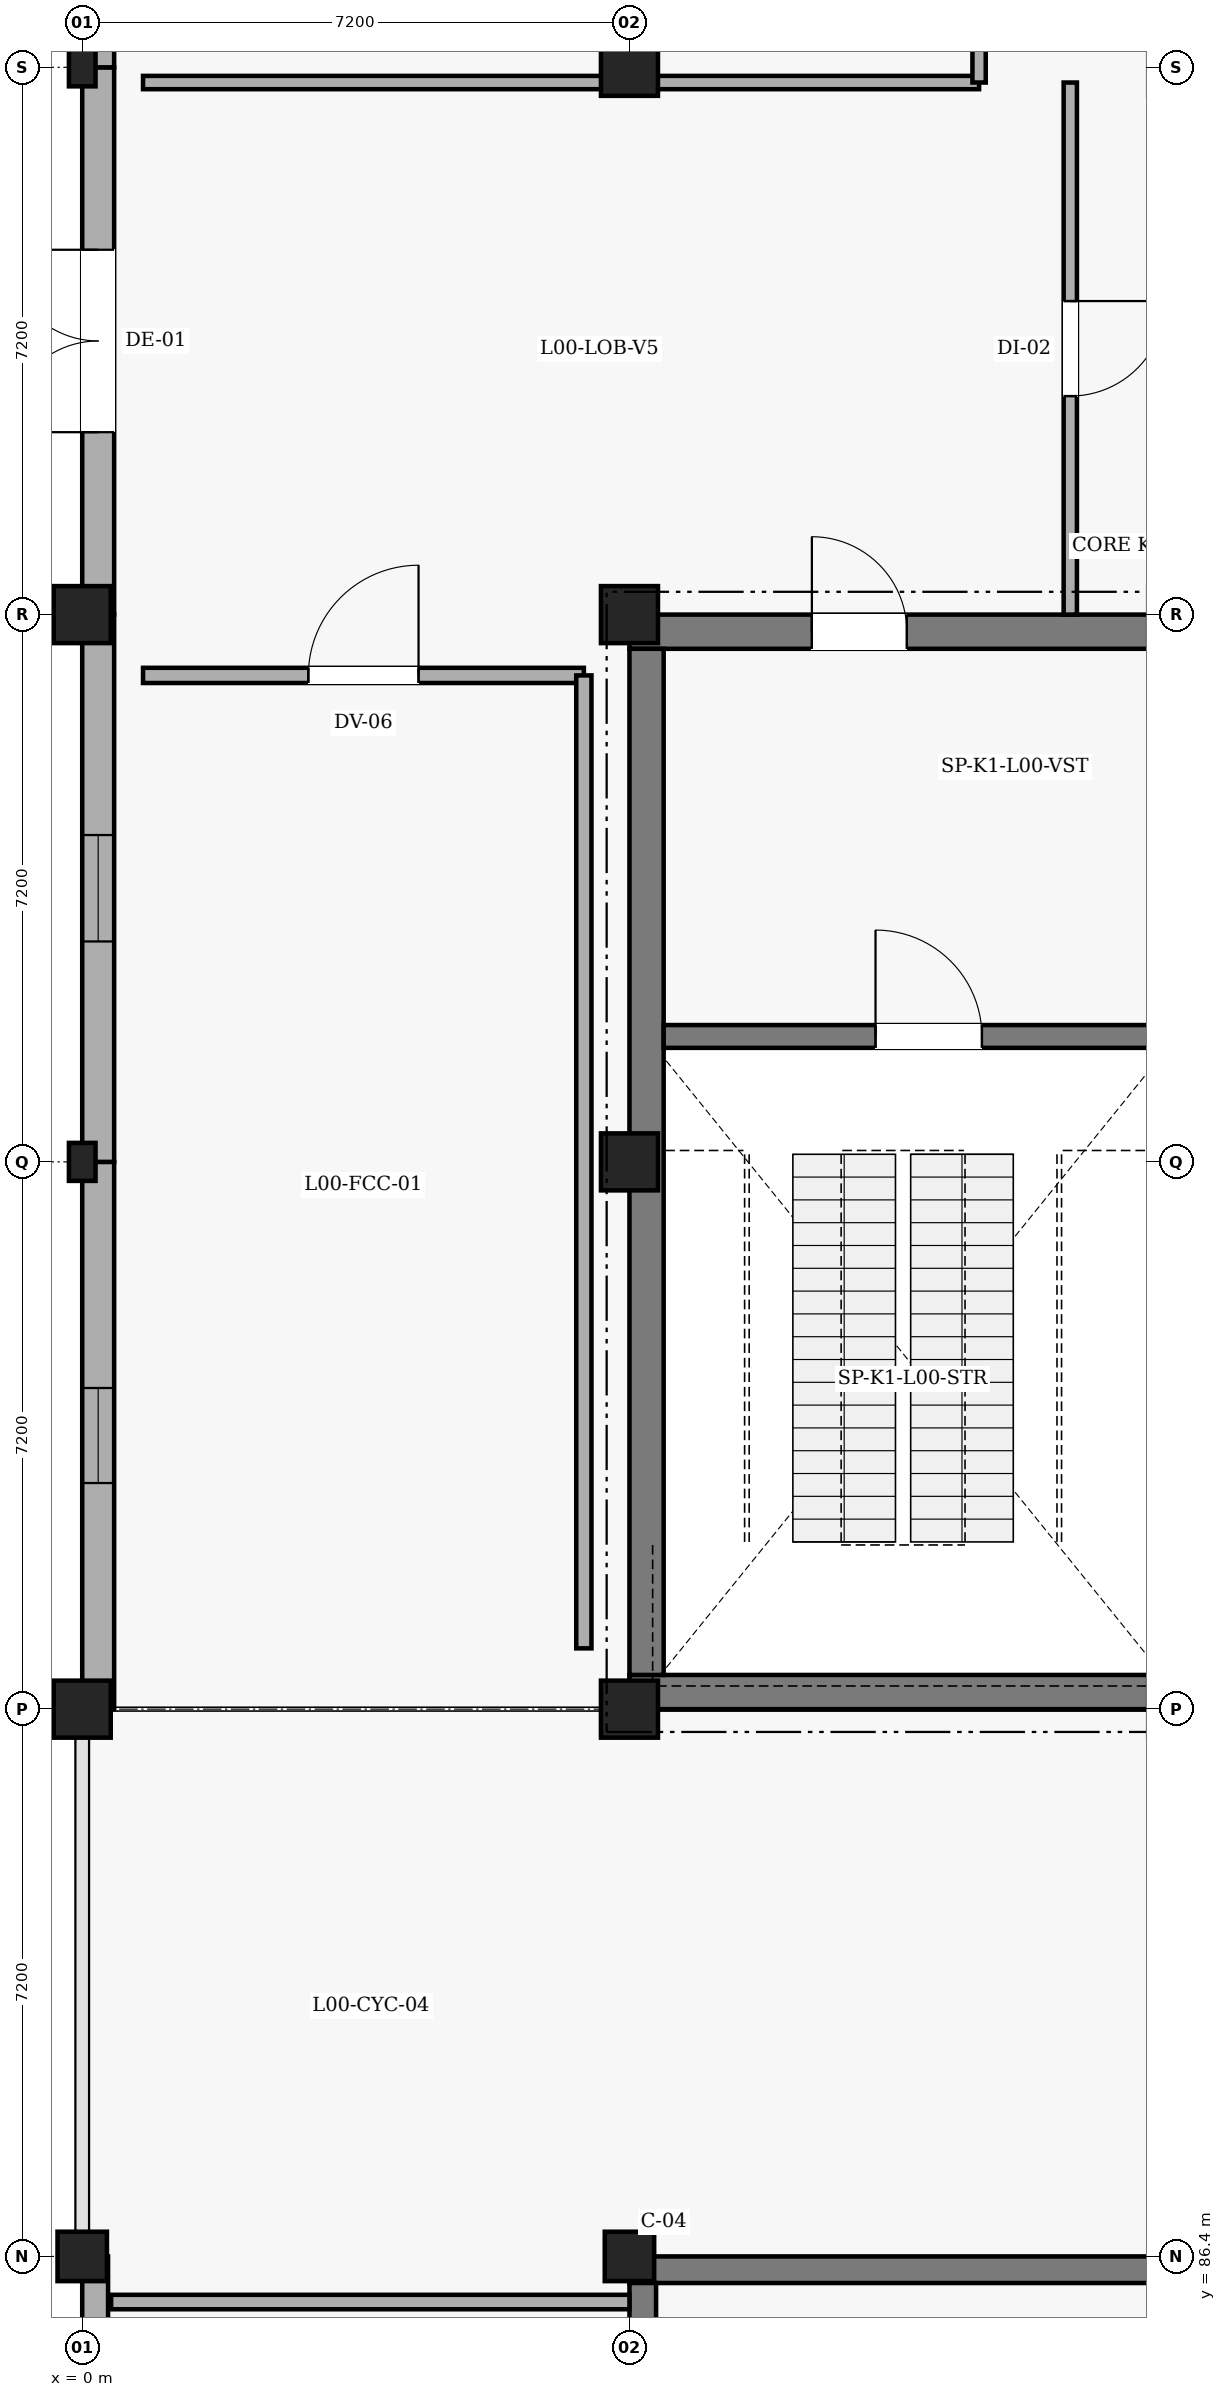
"""IFC4 building model, lengths in metres.
Left out: names, types, materials, properties, quantities, classifications, styles, units other than length and angle.
Written with IfcOpenShell. Run it as: python <this file> out.ifc"""

import sys

from ifc_helpers import new_model, si_unit, direction, frame, frame_2d, origin, origin_2d, place, context, subcontext, project, spatial, rectangle, extrude, element, fill, save


model = new_model("IFC4")
c1 = context("Model", 3, precision=1e-05, world=origin(), true_north=direction((0.0, 1.0)))
c2 = subcontext(c1, "Body", "Model", "MODEL_VIEW")
j1 = project(units=[si_unit("LENGTHUNIT", "METRE"), si_unit("PLANEANGLEUNIT", "RADIAN")], contexts=[c1])
p1 = place(None, origin())
s1 = spatial("IfcSite", under=j1, at=p1, CompositionType="ELEMENT")
p2 = place(p1, origin())
s2 = spatial("IfcBuilding", under=s1, at=p2, CompositionType="ELEMENT")
p3 = place(p2, origin())
s3 = spatial("IfcBuildingStorey", under=s2, at=p3, CompositionType="ELEMENT", Elevation=0.0)
p4 = place(p3, frame((7.2, 107.775, 0.0), z_axis=(0.0, 0.0, 1.0), x_axis=(1.0, 0.0, 0.0)))
e1 = element("IfcWall", 1, at=p4, inside=s3, PredefinedType="SHEAR", context=c2, shape_type="SweptSolid", body=[
    extrude(rectangle(XDim=14.4, YDim=0.45, at=frame_2d((7.2, 0.0))), origin(), (0.0, 0.0, 1.0), 5.4),
])
p5 = place(p4, frame((2.4, 0.0, 0.0)))
e2 = element("IfcOpeningElement", 2, at=p5, cuts=e1, PredefinedType="OPENING", context=c2, shape_type="SweptSolid", body=[
    extrude(rectangle(XDim=1.25, YDim=2.2, at=frame_2d((0.625, 1.1))), frame((0.0, 0.235, 0.0), z_axis=(0.0, -1.0, 0.0), x_axis=(1.0, 0.0, 0.0)), (0.0, 0.0, 1.0), 0.47),
])
p6 = place(p3, frame((21.6, 93.825, 0.0), z_axis=(0.0, 0.0, 1.0), x_axis=(-1.0, 0.0, 0.0)))
e3 = element("IfcWall", 3, at=p6, inside=s3, PredefinedType="SHEAR", context=c2, shape_type="SweptSolid", body=[
    extrude(rectangle(XDim=14.4, YDim=0.45, at=frame_2d((7.2, 0.0))), origin(), (0.0, 0.0, 1.0), 5.4),
])
p7 = place(p3, frame((7.425, 94.05, 0.0), z_axis=(0.0, 0.0, 1.0), x_axis=(0.0, 1.0, 0.0)))
e4 = element("IfcWall", 4, at=p7, inside=s3, PredefinedType="SHEAR", context=c2, shape_type="SweptSolid", body=[
    extrude(rectangle(XDim=13.5, YDim=0.45, at=frame_2d((6.75, 0.0))), origin(), (0.0, 0.0, 1.0), 5.4),
])
p8 = place(p3, frame((7.65, 102.45, 0.0), z_axis=(0.0, 0.0, 1.0), x_axis=(1.0, 0.0, 0.0)))
e5 = element("IfcWall", 5, at=p8, inside=s3, PredefinedType="SHEAR", context=c2, shape_type="SweptSolid", body=[
    extrude(rectangle(XDim=6.575, YDim=0.3, at=frame_2d((3.288, 0.0))), origin(), (0.0, 0.0, 1.0), 5.4),
])
p9 = place(p8, frame((2.788, 0.0, 0.0)))
e6 = element("IfcOpeningElement", 6, at=p9, cuts=e5, PredefinedType="OPENING", context=c2, shape_type="SweptSolid", body=[
    extrude(rectangle(XDim=1.4, YDim=2.2, at=frame_2d((0.7, 1.1))), frame((0.0, 0.16, 0.0), z_axis=(0.0, -1.0, 0.0), x_axis=(1.0, 0.0, 0.0)), (0.0, 0.0, 1.0), 0.32),
])
p10 = place(p3, frame((7.2, 86.225, 0.0), z_axis=(0.0, 0.0, 1.0), x_axis=(1.0, 0.0, 0.0)))
e7 = element("IfcWall", 7, at=p10, inside=s3, PredefinedType="SHEAR", context=c2, shape_type="SweptSolid", body=[
    extrude(rectangle(XDim=14.4, YDim=0.35, at=frame_2d((7.2, 0.0))), origin(), (0.0, 0.0, 1.0), 5.4),
])
p11 = place(p3, frame((7.375, 72.35, 0.0), z_axis=(0.0, 0.0, 1.0), x_axis=(0.0, 1.0, 0.0)))
e8 = element("IfcWall", 8, at=p11, inside=s3, PredefinedType="SHEAR", context=c2, shape_type="SweptSolid", body=[
    extrude(rectangle(XDim=13.7, YDim=0.35, at=frame_2d((6.85, 0.0))), origin(), (0.0, 0.0, 1.0), 5.4),
])
p12 = place(p11, frame((9.8, 0.0, 0.0)))
e9 = element("IfcOpeningElement", 9, at=p12, cuts=e8, PredefinedType="OPENING", context=c2, shape_type="SweptSolid", body=[
    extrude(rectangle(XDim=1.25, YDim=2.2, at=frame_2d((0.625, 1.1))), frame((0.0, 0.185, 0.0), z_axis=(0.0, -1.0, 0.0), x_axis=(1.0, 0.0, 0.0)), (0.0, 0.0, 1.0), 0.37),
])
p13 = place(p3, frame((0.0, 86.4, 0.0), z_axis=(0.0, 0.0, 1.0), x_axis=(0.0, 1.0, 0.0)))
e10 = element("IfcColumn", 10, at=p13, inside=s3, PredefinedType="COLUMN", context=c2, shape_type="SweptSolid", body=[
    extrude(rectangle(XDim=0.65, YDim=0.65, at=origin_2d()), origin(), (0.0, 0.0, 1.0), 5.12),
])
p14 = place(p3, frame((0.0, 93.6, 0.0), z_axis=(0.0, 0.0, 1.0), x_axis=(0.0, 1.0, 0.0)))
e11 = element("IfcColumn", 11, at=p14, inside=s3, PredefinedType="COLUMN", context=c2, shape_type="SweptSolid", body=[
    extrude(rectangle(XDim=0.75, YDim=0.75, at=origin_2d()), origin(), (0.0, 0.0, 1.0), 5.08),
])
p15 = place(p3, frame((0.0, 100.8, 0.0), z_axis=(0.0, 0.0, 1.0), x_axis=(1.0, 0.0, 0.0)))
e12 = element("IfcColumn", 12, at=p15, inside=s3, PredefinedType="PILASTER", context=c2, shape_type="SweptSolid", body=[
    extrude(rectangle(XDim=0.35, YDim=0.5, at=origin_2d()), origin(), (0.0, 0.0, 1.0), 5.08),
])
p16 = place(p3, frame((0.0, 108.0, 0.0), z_axis=(0.0, 0.0, 1.0), x_axis=(1.0, 0.0, 0.0)))
e13 = element("IfcColumn", 13, at=p16, inside=s3, PredefinedType="COLUMN", context=c2, shape_type="SweptSolid", body=[
    extrude(rectangle(XDim=0.75, YDim=0.75, at=origin_2d()), origin(), (0.0, 0.0, 1.0), 5.08),
])
p17 = place(p3, frame((0.0, 115.2, 0.0), z_axis=(0.0, 0.0, 1.0), x_axis=(1.0, 0.0, 0.0)))
e14 = element("IfcColumn", 14, at=p17, inside=s3, PredefinedType="PILASTER", context=c2, shape_type="SweptSolid", body=[
    extrude(rectangle(XDim=0.35, YDim=0.5, at=origin_2d()), origin(), (0.0, 0.0, 1.0), 5.08),
])
p18 = place(p3, frame((7.2, 86.4, 0.0), z_axis=(0.0, 0.0, 1.0), x_axis=(1.0, 0.0, 0.0)))
e15 = element("IfcColumn", 15, at=p18, inside=s3, PredefinedType="COLUMN", context=c2, shape_type="SweptSolid", body=[
    extrude(rectangle(XDim=0.65, YDim=0.65, at=origin_2d()), origin(), (0.0, 0.0, 1.0), 5.12),
])
for number, where, z_axis, x_axis in (
    (16, (7.2, 93.6, 0.0), (0.0, 0.0, 1.0), (1.0, 0.0, 0.0)),
    (17, (7.2, 100.8, 0.0), (0.0, 0.0, 1.0), (1.0, 0.0, 0.0)),
    (18, (7.2, 108.0, 0.0), (0.0, 0.0, 1.0), (1.0, 0.0, 0.0)),
    (19, (7.2, 115.2, 0.0), (0.0, 0.0, 1.0), (1.0, 0.0, 0.0)),
):
    element("IfcColumn", number, at=place(p3, frame(where, z_axis=z_axis, x_axis=x_axis)), inside=s3, PredefinedType="COLUMN", context=c2, shape_type="SweptSolid", body=[
        extrude(rectangle(XDim=0.75, YDim=0.75, at=origin_2d()), origin(), (0.0, 0.0, 1.0), 5.08),
    ])
p19 = place(p3, frame((0.17, 79.2, 0.0), z_axis=(0.0, 0.0, 1.0), x_axis=(0.0, 1.0, 0.0)))
e20 = element("IfcWall", 20, at=p19, inside=s3, PredefinedType="SOLIDWALL", context=c2, shape_type="SweptSolid", body=[
    extrude(rectangle(XDim=7.2, YDim=0.34, at=frame_2d((3.6, 0.0))), origin(), (0.0, 0.0, 1.0), 4.79),
])
p20 = place(p19, frame((2.6, 0.0, 0.0)))
e21 = element("IfcOpeningElement", 21, at=p20, cuts=e20, PredefinedType="OPENING", context=c2, shape_type="SweptSolid", body=[
    extrude(rectangle(XDim=2.0, YDim=2.3, at=frame_2d((1.0, 1.15))), frame((0.0, 0.18, 0.0), z_axis=(0.0, -1.0, 0.0), x_axis=(1.0, 0.0, 0.0)), (0.0, 0.0, 1.0), 0.36),
])
p21 = place(p3, frame((0.21, 93.6, 0.0), z_axis=(0.0, 0.0, 1.0), x_axis=(0.0, 1.0, 0.0)))
e22 = element("IfcWall", 22, at=p21, inside=s3, PredefinedType="SOLIDWALL", context=c2, shape_type="SweptSolid", body=[
    extrude(rectangle(XDim=7.2, YDim=0.42, at=frame_2d((3.6, 0.0))), origin(), (0.0, 0.0, 1.0), 4.75),
])
p22 = place(p21, frame((2.975, 0.0, 0.9)))
e23 = element("IfcOpeningElement", 23, at=p22, cuts=e22, PredefinedType="OPENING", context=c2, shape_type="SweptSolid", body=[
    extrude(rectangle(XDim=1.25, YDim=1.25, at=frame_2d((0.625, 0.625))), frame((0.0, 0.22, 0.0), z_axis=(0.0, -1.0, 0.0), x_axis=(1.0, 0.0, 0.0)), (0.0, 0.0, 1.0), 0.44),
])
p23 = place(p3, frame((0.21, 100.8, 0.0), z_axis=(0.0, 0.0, 1.0), x_axis=(0.0, 1.0, 0.0)))
e24 = element("IfcWall", 24, at=p23, inside=s3, PredefinedType="SOLIDWALL", context=c2, shape_type="SweptSolid", body=[
    extrude(rectangle(XDim=7.2, YDim=0.42, at=frame_2d((3.6, 0.0))), origin(), (0.0, 0.0, 1.0), 4.75),
])
p24 = place(p23, frame((2.9, 0.0, 0.9)))
e25 = element("IfcOpeningElement", 25, at=p24, cuts=e24, PredefinedType="OPENING", context=c2, shape_type="SweptSolid", body=[
    extrude(rectangle(XDim=1.4, YDim=1.3, at=frame_2d((0.7, 0.65))), frame((0.0, 0.22, 0.0), z_axis=(0.0, -1.0, 0.0), x_axis=(1.0, 0.0, 0.0)), (0.0, 0.0, 1.0), 0.44),
])
p25 = place(p3, frame((0.21, 108.0, 0.0), z_axis=(0.0, 0.0, 1.0), x_axis=(0.0, 1.0, 0.0)))
e26 = element("IfcWall", 26, at=p25, inside=s3, PredefinedType="SOLIDWALL", context=c2, shape_type="SweptSolid", body=[
    extrude(rectangle(XDim=7.2, YDim=0.42, at=frame_2d((3.6, 0.0))), origin(), (0.0, 0.0, 1.0), 4.75),
])
p26 = place(p25, frame((2.4, 0.0, 0.0)))
e27 = element("IfcOpeningElement", 27, at=p26, cuts=e26, PredefinedType="OPENING", context=c2, shape_type="SweptSolid", body=[
    extrude(rectangle(XDim=2.4, YDim=2.5, at=frame_2d((1.2, 1.25))), frame((0.0, 0.22, 0.0), z_axis=(0.0, -1.0, 0.0), x_axis=(1.0, 0.0, 0.0)), (0.0, 0.0, 1.0), 0.44),
])
p27 = place(p3, frame((0.21, 115.2, 0.0), z_axis=(0.0, 0.0, 1.0), x_axis=(0.0, 1.0, 0.0)))
e28 = element("IfcWall", 28, at=p27, inside=s3, PredefinedType="SOLIDWALL", context=c2, shape_type="SweptSolid", body=[
    extrude(rectangle(XDim=7.2, YDim=0.42, at=frame_2d((3.6, 0.0))), origin(), (0.0, 0.0, 1.0), 4.75),
])
p28 = place(p27, frame((2.825, 0.0, 0.9)))
e29 = element("IfcOpeningElement", 29, at=p28, cuts=e28, PredefinedType="OPENING", context=c2, shape_type="SweptSolid", body=[
    extrude(rectangle(XDim=1.55, YDim=1.35, at=frame_2d((0.775, 0.675))), frame((0.0, 0.22, 0.0), z_axis=(0.0, -1.0, 0.0), x_axis=(1.0, 0.0, 0.0)), (0.0, 0.0, 1.0), 0.44),
])
p29 = place(p3, frame((0.38, 85.8, 0.0), z_axis=(0.0, 0.0, 1.0), x_axis=(1.0, 0.0, 0.0)))
e30 = element("IfcWall", 30, at=p29, inside=s3, PredefinedType="PARTITIONING", context=c2, shape_type="SweptSolid", body=[
    extrude(rectangle(XDim=6.82, YDim=0.19, at=frame_2d((3.41, 0.0))), origin(), (0.0, 0.0, 1.0), 5.05),
])
p30 = place(p3, frame((0.8, 107.2, 0.0), z_axis=(0.0, 0.0, 1.0), x_axis=(1.0, 0.0, 0.0)))
e31 = element("IfcWall", 31, at=p30, inside=s3, PredefinedType="PARTITIONING", context=c2, shape_type="SweptSolid", body=[
    extrude(rectangle(XDim=5.8, YDim=0.2, at=frame_2d((2.9, 0.0))), origin(), (0.0, 0.0, 1.0), 5.05),
])
p31 = place(p30, frame((2.175, 0.0, 0.0)))
e32 = element("IfcOpeningElement", 32, at=p31, cuts=e31, PredefinedType="OPENING", context=c2, shape_type="SweptSolid", body=[
    extrude(rectangle(XDim=1.45, YDim=2.2, at=frame_2d((0.725, 1.1))), frame((0.0, 0.11, 0.0), z_axis=(0.0, -1.0, 0.0), x_axis=(1.0, 0.0, 0.0)), (0.0, 0.0, 1.0), 0.22),
])
p32 = place(p3, frame((6.6, 107.2, 0.0), z_axis=(0.0, 0.0, 1.0), x_axis=(0.0, -1.0, 0.0)))
e33 = element("IfcWall", 33, at=p32, inside=s3, PredefinedType="PARTITIONING", context=c2, shape_type="SweptSolid", body=[
    extrude(rectangle(XDim=12.8, YDim=0.2, at=frame_2d((6.4, 0.0))), origin(), (0.0, 0.0, 1.0), 4.63),
])
p33 = place(p3, frame((13.0, 115.0, 0.0), z_axis=(0.0, 0.0, 1.0), x_axis=(0.0, -1.0, 0.0)))
e34 = element("IfcWall", 34, at=p33, inside=s3, PredefinedType="PARTITIONING", context=c2, shape_type="SweptSolid", body=[
    extrude(rectangle(XDim=7.0, YDim=0.175, at=frame_2d((3.5, 0.0))), origin(), (0.0, 0.0, 1.0), 4.75),
])
p34 = place(p33, frame((2.875, 0.0, 0.0)))
e35 = element("IfcOpeningElement", 35, at=p34, cuts=e34, PredefinedType="OPENING", context=c2, shape_type="SweptSolid", body=[
    extrude(rectangle(XDim=1.25, YDim=2.2, at=frame_2d((0.625, 1.1))), frame((0.0, 0.097, 0.0), z_axis=(0.0, -1.0, 0.0), x_axis=(1.0, 0.0, 0.0)), (0.0, 0.0, 1.0), 0.195),
])
p35 = place(p3, frame((11.8, 115.0, 0.0), z_axis=(0.0, 0.0, 1.0), x_axis=(-1.0, 0.0, 0.0)))
e36 = element("IfcWall", 36, at=p35, inside=s3, PredefinedType="PARTITIONING", context=c2, shape_type="SweptSolid", body=[
    extrude(rectangle(XDim=11.0, YDim=0.175, at=frame_2d((5.5, 0.0))), origin(), (0.0, 0.0, 1.0), 4.63),
])
p36 = place(p3, frame((11.8, 121.4, 0.0), z_axis=(0.0, 0.0, 1.0), x_axis=(0.0, -1.0, 0.0)))
e37 = element("IfcWall", 37, at=p36, inside=s3, PredefinedType="PARTITIONING", context=c2, shape_type="SweptSolid", body=[
    extrude(rectangle(XDim=6.4, YDim=0.175, at=frame_2d((3.2, 0.0))), origin(), (0.0, 0.0, 1.0), 4.63),
])
p37 = place(p36, frame((2.325, 0.0, 0.0)))
e38 = element("IfcOpeningElement", 38, at=p37, cuts=e37, PredefinedType="OPENING", context=c2, shape_type="SweptSolid", body=[
    extrude(rectangle(XDim=1.75, YDim=2.25, at=frame_2d((0.875, 1.125))), frame((0.0, 0.097, 0.0), z_axis=(0.0, -1.0, 0.0), x_axis=(1.0, 0.0, 0.0)), (0.0, 0.0, 1.0), 0.195),
])
p38 = place(p22, origin())
e39 = element("IfcWindow", 39, at=p38, inside=s3, PartitioningType="SINGLE_PANEL", PredefinedType="WINDOW", context=c2, shape_type="SweptSolid", body=[
    extrude(rectangle(XDim=1.25, YDim=1.25, at=frame_2d((0.625, 0.625))), frame((0.0, 0.03, 0.0), z_axis=(0.0, -1.0, 0.0), x_axis=(1.0, 0.0, 0.0)), (0.0, 0.0, 1.0), 0.06),
])
fill(e23, e39)
p39 = place(p24, origin())
e40 = element("IfcWindow", 40, at=p39, inside=s3, PartitioningType="SINGLE_PANEL", PredefinedType="WINDOW", context=c2, shape_type="SweptSolid", body=[
    extrude(rectangle(XDim=1.4, YDim=1.3, at=frame_2d((0.7, 0.65))), frame((0.0, 0.03, 0.0), z_axis=(0.0, -1.0, 0.0), x_axis=(1.0, 0.0, 0.0)), (0.0, 0.0, 1.0), 0.06),
])
fill(e25, e40)
p40 = place(p26, origin())
e41 = element("IfcDoor", 41, at=p40, inside=s3, OperationType="DOUBLE_DOOR_SINGLE_SWING", PredefinedType="DOOR", context=c2, shape_type="SweptSolid", body=[
    extrude(rectangle(XDim=2.4, YDim=2.5, at=frame_2d((1.2, 1.25))), frame((0.0, 0.025, 0.0), z_axis=(0.0, -1.0, 0.0), x_axis=(1.0, 0.0, 0.0)), (0.0, 0.0, 1.0), 0.05),
])
fill(e27, e41)
p41 = place(p9, origin())
e42 = element("IfcDoor", 42, at=p41, inside=s3, OperationType="SINGLE_SWING_LEFT", PredefinedType="DOOR", context=c2, shape_type="SweptSolid", body=[
    extrude(rectangle(XDim=1.4, YDim=2.2, at=frame_2d((0.7, 1.1))), frame((0.0, 0.025, 0.0), z_axis=(0.0, -1.0, 0.0), x_axis=(1.0, 0.0, 0.0)), (0.0, 0.0, 1.0), 0.05),
])
fill(e6, e42)
p42 = place(p5, origin())
e43 = element("IfcDoor", 43, at=p42, inside=s3, OperationType="SINGLE_SWING_LEFT", PredefinedType="DOOR", context=c2, shape_type="SweptSolid", body=[
    extrude(rectangle(XDim=1.25, YDim=2.2, at=frame_2d((0.625, 1.1))), frame((0.0, 0.025, 0.0), z_axis=(0.0, -1.0, 0.0), x_axis=(1.0, 0.0, 0.0)), (0.0, 0.0, 1.0), 0.05),
])
fill(e2, e43)
p43 = place(p31, origin())
e44 = element("IfcDoor", 44, at=p43, inside=s3, OperationType="SINGLE_SWING_RIGHT", PredefinedType="DOOR", context=c2, shape_type="SweptSolid", body=[
    extrude(rectangle(XDim=1.45, YDim=2.2, at=frame_2d((0.725, 1.1))), frame((0.0, 0.025, 0.0), z_axis=(0.0, -1.0, 0.0), x_axis=(1.0, 0.0, 0.0)), (0.0, 0.0, 1.0), 0.05),
])
fill(e32, e44)
p44 = place(p34, origin())
e45 = element("IfcDoor", 45, at=p44, inside=s3, OperationType="SINGLE_SWING_LEFT", PredefinedType="DOOR", context=c2, shape_type="SweptSolid", body=[
    extrude(rectangle(XDim=1.25, YDim=2.2, at=frame_2d((0.625, 1.1))), frame((0.0, 0.025, 0.0), z_axis=(0.0, -1.0, 0.0), x_axis=(1.0, 0.0, 0.0)), (0.0, 0.0, 1.0), 0.05),
])
fill(e35, e45)
save(model, sys.argv[1])
